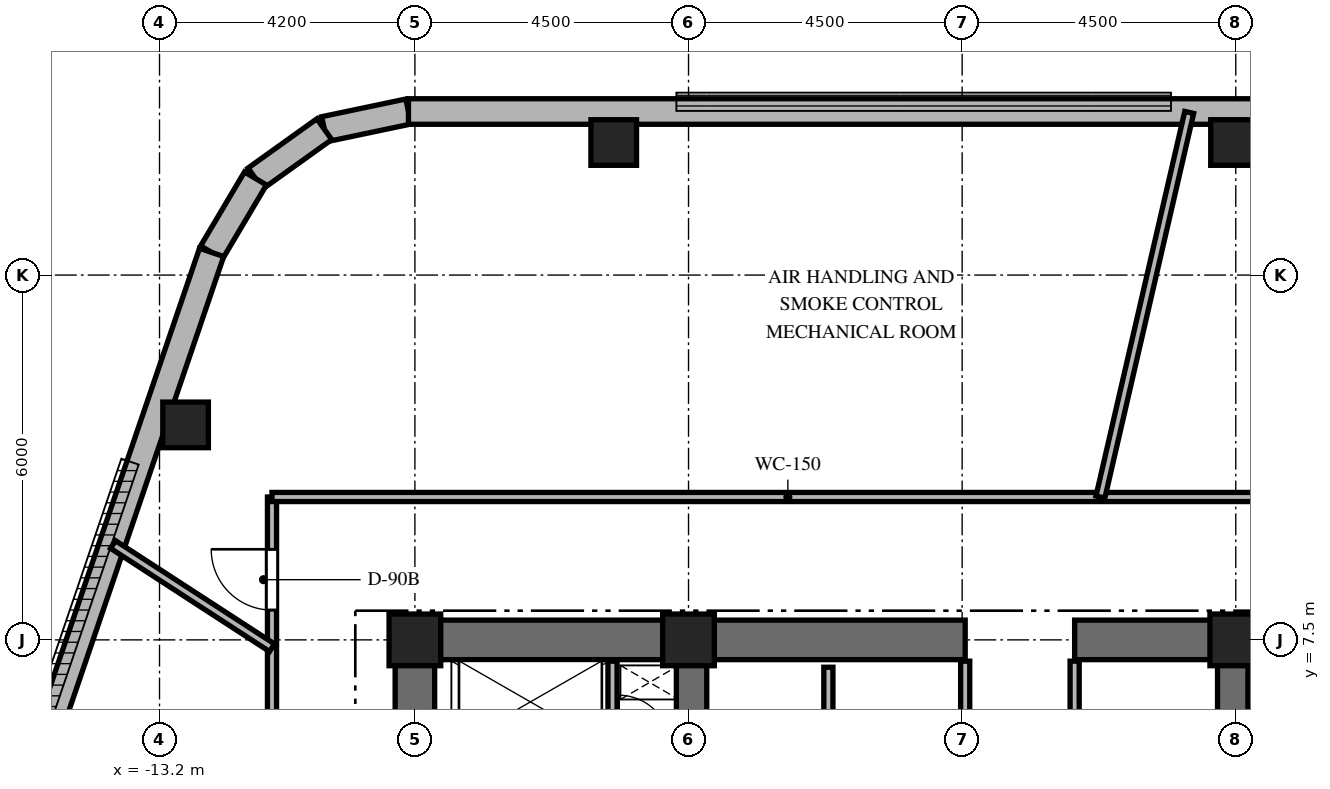
"""IFC4 building model, lengths in metres.
Left out: names, types, materials, properties, quantities, classifications, styles, units other than length and angle.
Written with IfcOpenShell. Run it as: python <this file> out.ifc"""

import sys

from ifc_helpers import new_model, si_unit, direction, frame, frame_2d, origin, origin_2d, place, context, subcontext, project, spatial, rectangle, extrude, element, fill, save


model = new_model("IFC4")
c1 = context("Model", 3, precision=1e-05, world=origin(), true_north=direction((0.0, 1.0)))
c2 = subcontext(c1, "Body", "Model", "MODEL_VIEW")
j1 = project(units=[si_unit("LENGTHUNIT", "METRE"), si_unit("PLANEANGLEUNIT", "RADIAN")], contexts=[c1])
p1 = place(None, origin())
s1 = spatial("IfcSite", under=j1, at=p1, CompositionType="ELEMENT")
p2 = place(p1, origin())
s2 = spatial("IfcBuilding", under=s1, at=p2, CompositionType="ELEMENT")
p3 = place(p2, frame((0.0, 0.0, 315.9)))
s3 = spatial("IfcBuildingStorey", under=s2, at=p3, CompositionType="ELEMENT", Elevation=315.9)
p4 = place(p3, frame((-9.325, 7.5, 0.0), z_axis=(0.0, 0.0, 1.0), x_axis=(1.0, 0.0, 0.0)))
e1 = element("IfcWall", 1, at=p4, inside=s3, PredefinedType="SHEAR", context=c2, shape_type="SweptSolid", body=[
    extrude(rectangle(XDim=9.375, YDim=0.65, at=frame_2d((4.688, 0.0))), origin(), (0.0, 0.0, 1.0), 5.5),
])
p5 = place(p3, frame((1.85, 7.5, 0.0), z_axis=(0.0, 0.0, 1.0), x_axis=(1.0, 0.0, 0.0)))
e2 = element("IfcWall", 2, at=p5, inside=s3, PredefinedType="SHEAR", context=c2, shape_type="SweptSolid", body=[
    extrude(rectangle(XDim=7.475, YDim=0.65, at=frame_2d((3.737, 0.0))), origin(), (0.0, 0.0, 1.0), 5.5),
])
p6 = place(p3, frame((-9.0, -7.175, 0.0), z_axis=(0.0, 0.0, 1.0), x_axis=(0.0, 1.0, 0.0)))
e3 = element("IfcWall", 3, at=p6, inside=s3, PredefinedType="SHEAR", context=c2, shape_type="SweptSolid", body=[
    extrude(rectangle(XDim=14.35, YDim=0.65, at=frame_2d((7.175, 0.0))), origin(), (0.0, 0.0, 1.0), 5.5),
])
p7 = place(p6, frame((10.3, 0.0, 0.0)))
e4 = element("IfcOpeningElement", 4, at=p7, cuts=e3, PredefinedType="OPENING", context=c2, shape_type="SweptSolid", body=[
    extrude(rectangle(XDim=1.05, YDim=2.15, at=frame_2d((0.525, 1.075))), frame((0.0, 0.335, 0.0), z_axis=(0.0, -1.0, 0.0), x_axis=(1.0, 0.0, 0.0)), (0.0, 0.0, 1.0), 0.67),
])
for number, where, z_axis, x_axis in (
    (5, (-4.45, 2.25, 0.0), (0.0, 0.0, 1.0), (0.0, 1.0, 0.0)),
    (6, (4.45, 2.25, 0.0), (0.0, 0.0, 1.0), (0.0, 1.0, 0.0)),
):
    element("IfcWall", number, at=place(p3, frame(where, z_axis=z_axis, x_axis=x_axis)), inside=s3, PredefinedType="SHEAR", context=c2, shape_type="SweptSolid", body=[
        extrude(rectangle(XDim=4.925, YDim=0.5, at=frame_2d((2.462, 0.0))), origin(), (0.0, 0.0, 1.0), 5.5),
    ])
for number, where, z_axis, x_axis in (
    (7, (4.5, 7.5, 0.0), (0.0, 0.0, 1.0), (1.0, 0.0, 0.0)),
    (8, (-4.5, 7.5, 0.0), (0.0, 0.0, 1.0), (1.0, 0.0, 0.0)),
    (9, (-9.0, 7.5, 0.0), (0.0, 0.0, 1.0), (1.0, 0.0, 0.0)),
):
    element("IfcColumn", number, at=place(p3, frame(where, z_axis=z_axis, x_axis=x_axis)), inside=s3, PredefinedType="COLUMN", context=c2, shape_type="SweptSolid", body=[
        extrude(rectangle(XDim=0.85, YDim=0.85, at=origin_2d()), origin(), (0.0, 0.0, 1.0), 5.5),
    ])
for number, where, z_axis, x_axis in (
    (10, (4.463, 15.68, 0.0), (0.0, 0.0, 1.0), (1.0, 0.0, 0.0)),
    (11, (-5.73, 15.68, 0.0), (0.0, 0.0, 1.0), (1.0, 0.0, 0.0)),
    (12, (-12.771, 11.036, 0.0), (0.0, 0.0, 1.0), (1.0, 0.0, 0.0)),
):
    element("IfcColumn", number, at=place(p3, frame(where, z_axis=z_axis, x_axis=x_axis)), inside=s3, PredefinedType="COLUMN", context=c2, shape_type="SweptSolid", body=[
        extrude(rectangle(XDim=0.75, YDim=0.75, at=origin_2d()), origin(), (0.0, 0.0, 1.0), 5.5),
    ])
p8 = place(p3, frame((-9.106, 16.19, 0.0), z_axis=(0.0, 0.0, 1.0), x_axis=(-0.978670507127, -0.205436215114, 0.0)))
e13 = element("IfcWall", 13, at=p8, inside=s3, PredefinedType="SOLIDWALL", context=c2, shape_type="SweptSolid", body=[
    extrude(rectangle(XDim=1.414, YDim=0.42, at=frame_2d((0.707, 0.0))), origin(), (0.0, 0.0, 1.0), 5.18),
])
p9 = place(p3, frame((-10.49, 15.899, 0.0), z_axis=(0.0, 0.0, 1.0), x_axis=(-0.813104912719, -0.58211717112, 0.0)))
e14 = element("IfcWall", 14, at=p9, inside=s3, PredefinedType="SOLIDWALL", context=c2, shape_type="SweptSolid", body=[
    extrude(rectangle(XDim=1.392, YDim=0.42, at=frame_2d((0.696, 0.0))), origin(), (0.0, 0.0, 1.0), 5.18),
])
p10 = place(p3, frame((-11.622, 15.089, 0.0), z_axis=(0.0, 0.0, 1.0), x_axis=(-0.510403153597, -0.859935242212, 0.0)))
e15 = element("IfcWall", 15, at=p10, inside=s3, PredefinedType="SOLIDWALL", context=c2, shape_type="SweptSolid", body=[
    extrude(rectangle(XDim=1.414, YDim=0.42, at=frame_2d((0.707, 0.0))), origin(), (0.0, 0.0, 1.0), 5.18),
])
p11 = place(p3, frame((7.84, 16.19, 0.0), z_axis=(0.0, 0.0, 1.0), x_axis=(-1.0, 0.0, 0.0)))
e16 = element("IfcWall", 16, at=p11, inside=s3, PredefinedType="SOLIDWALL", context=c2, shape_type="SweptSolid", body=[
    extrude(rectangle(XDim=16.946, YDim=0.42, at=frame_2d((8.473, 0.0))), origin(), (0.0, 0.0, 1.0), 5.18),
])
p12 = place(p3, frame((-12.344, 13.873, 0.0), z_axis=(0.0, 0.0, 1.0), x_axis=(-0.322553427155, -0.946551259378, 0.0)))
e17 = element("IfcWall", 17, at=p12, inside=s3, PredefinedType="SOLIDWALL", context=c2, shape_type="SweptSolid", body=[
    extrude(rectangle(XDim=14.191, YDim=0.42, at=frame_2d((7.096, 0.0))), origin(), (0.0, 0.0, 1.0), 5.18),
])
p13 = place(p3, frame((-5.75, 5.74, 0.0), z_axis=(0.0, 0.0, 1.0), x_axis=(0.0, 1.0, 0.0)))
e18 = element("IfcWall", 18, at=p13, inside=s3, PredefinedType="PARTITIONING", context=c2, shape_type="SweptSolid", body=[
    extrude(rectangle(XDim=1.41, YDim=0.15, at=frame_2d((0.705, 0.0))), origin(), (0.0, 0.0, 1.0), 5.18),
])
p14 = place(p3, frame((-2.2, 5.2, 0.0), z_axis=(0.0, 0.0, 1.0), x_axis=(0.0, 1.0, 0.0)))
e19 = element("IfcWall", 19, at=p14, inside=s3, PredefinedType="PARTITIONING", context=c2, shape_type="SweptSolid", body=[
    extrude(rectangle(XDim=1.85, YDim=0.15, at=frame_2d((0.925, 0.0))), origin(), (0.0, 0.0, 1.0), 5.18),
])
for number, where, z_axis, x_axis in (
    (20, (0.05, 5.2, 0.0), (0.0, 0.0, 1.0), (0.0, 1.0, 0.0)),
    (21, (1.85, 5.2, 0.0), (0.0, 0.0, 1.0), (0.0, 1.0, 0.0)),
):
    element("IfcWall", number, at=place(p3, frame(where, z_axis=z_axis, x_axis=x_axis)), inside=s3, PredefinedType="PARTITIONING", context=c2, shape_type="SweptSolid", body=[
        extrude(rectangle(XDim=1.95, YDim=0.15, at=frame_2d((0.975, 0.0))), origin(), (0.0, 0.0, 1.0), 5.18),
    ])
p15 = place(p3, frame((-11.35, -9.85, 0.0), z_axis=(0.0, 0.0, 1.0), x_axis=(0.0, 1.0, 0.0)))
e22 = element("IfcWall", 22, at=p15, inside=s3, PredefinedType="PARTITIONING", context=c2, shape_type="SweptSolid", body=[
    extrude(rectangle(XDim=19.7, YDim=0.15, at=frame_2d((9.85, 0.0))), origin(), (0.0, 0.0, 1.0), 4.67),
])
p16 = place(p15, frame((17.84, 0.0, 0.0)))
e23 = element("IfcOpeningElement", 23, at=p16, cuts=e22, PredefinedType="OPENING", context=c2, shape_type="SweptSolid", body=[
    extrude(rectangle(XDim=1.0, YDim=2.15, at=frame_2d((0.5, 1.075))), frame((0.0, 0.085, 0.0), z_axis=(0.0, -1.0, 0.0), x_axis=(1.0, 0.0, 0.0)), (0.0, 0.0, 1.0), 0.17),
])
p17 = place(p15, frame((8.752, 0.0, 0.0)))
e24 = element("IfcOpeningElement", 24, at=p17, cuts=e22, PredefinedType="OPENING", context=c2, shape_type="SweptSolid", body=[
    extrude(rectangle(XDim=1.0, YDim=2.15, at=frame_2d((0.5, 1.075))), frame((0.0, 0.085, 0.0), z_axis=(0.0, -1.0, 0.0), x_axis=(1.0, 0.0, 0.0)), (0.0, 0.0, 1.0), 0.17),
])
p18 = place(p3, frame((-11.35, 9.85, 0.0), z_axis=(0.0, 0.0, 1.0), x_axis=(1.0, 0.0, 0.0)))
e25 = element("IfcWall", 25, at=p18, inside=s3, PredefinedType="PARTITIONING", context=c2, shape_type="SweptSolid", body=[
    extrude(rectangle(XDim=22.7, YDim=0.15, at=frame_2d((11.35, 0.0))), origin(), (0.0, 0.0, 1.0), 4.67),
])
p19 = place(p18, frame((17.542, 0.0, 0.0)))
e26 = element("IfcOpeningElement", 26, at=p19, cuts=e25, PredefinedType="OPENING", context=c2, shape_type="SweptSolid", body=[
    extrude(rectangle(XDim=1.0, YDim=2.15, at=frame_2d((0.5, 1.075))), frame((0.0, 0.085, 0.0), z_axis=(0.0, -1.0, 0.0), x_axis=(1.0, 0.0, 0.0)), (0.0, 0.0, 1.0), 0.17),
])
p20 = place(p3, frame((2.274, 9.85, 0.0), z_axis=(0.0, 0.0, 1.0), x_axis=(0.224947404091, 0.974370907505, 0.0)))
e27 = element("IfcWall", 27, at=p20, inside=s3, PredefinedType="PARTITIONING", context=c2, shape_type="SweptSolid", body=[
    extrude(rectangle(XDim=6.491, YDim=0.15, at=frame_2d((3.246, 0.0))), origin(), (0.0, 0.0, 1.0), 4.52),
])
p21 = place(p3, frame((-11.35, 7.371, 0.0), z_axis=(0.0, 0.0, 1.0), x_axis=(-0.83868866546, 0.544611166272, 0.0)))
e28 = element("IfcWall", 28, at=p21, inside=s3, PredefinedType="PARTITIONING", context=c2, shape_type="SweptSolid", body=[
    extrude(rectangle(XDim=3.117, YDim=0.15, at=frame_2d((1.559, 0.0))), origin(), (0.0, 0.0, 1.0), 4.52),
])
p22 = place(p16, origin())
e29 = element("IfcDoor", 29, at=p22, inside=s3, OperationType="SINGLE_SWING_RIGHT", PredefinedType="DOOR", context=c2, shape_type="SweptSolid", body=[
    extrude(rectangle(XDim=1.0, YDim=2.15, at=frame_2d((0.5, 1.075))), frame((0.0, 0.025, 0.0), z_axis=(0.0, -1.0, 0.0), x_axis=(1.0, 0.0, 0.0)), (0.0, 0.0, 1.0), 0.05),
])
fill(e23, e29)
save(model, sys.argv[1])
